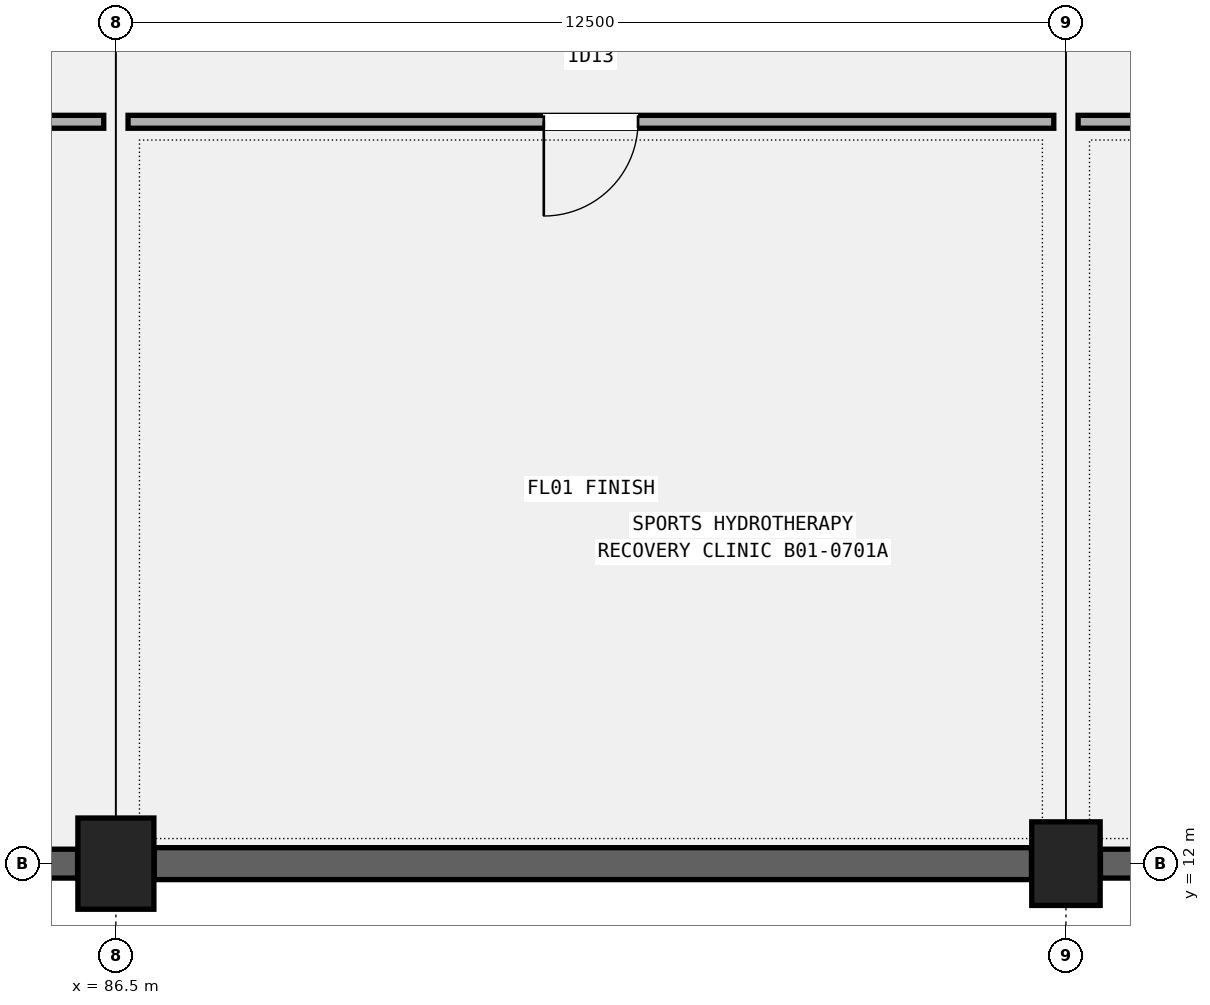
"""IFC4 building model, lengths in metres.
Left out: names, types, materials, properties, quantities, classifications, styles, units other than length and angle.
Written with IfcOpenShell. Run it as: python <this file> out.ifc"""

import sys

from ifc_helpers import new_model, si_unit, direction, frame, frame_2d, origin, origin_2d, place, context, subcontext, project, spatial, rectangle, extrude, element, fill, save


model = new_model("IFC4")
c1 = context("Model", 3, precision=1e-05, world=origin(), true_north=direction((0.0, 1.0)))
c2 = subcontext(c1, "Body", "Model", "MODEL_VIEW")
j1 = project(units=[si_unit("LENGTHUNIT", "METRE"), si_unit("PLANEANGLEUNIT", "RADIAN")], contexts=[c1])
p1 = place(None, origin())
s1 = spatial("IfcSite", under=j1, at=p1, CompositionType="ELEMENT")
p2 = place(p1, origin())
s2 = spatial("IfcBuilding", under=s1, at=p2, CompositionType="ELEMENT")
p3 = place(p2, frame((0.0, 0.0, -4.8)))
s3 = spatial("IfcBuildingStorey", under=s2, at=p3, CompositionType="ELEMENT", Elevation=-4.8)
p4 = place(p3, frame((86.5, 12.0, 0.0), z_axis=(0.0, 0.0, 1.0), x_axis=(1.0, 0.0, 0.0)))
e1 = element("IfcColumn", 1, at=p4, inside=s3, PredefinedType="COLUMN", context=c2, shape_type="SweptSolid", body=[
    extrude(rectangle(XDim=1.0, YDim=1.2, at=origin_2d()), origin(), (0.0, 0.0, 1.0), 4.8),
])
p5 = place(p3, frame((99.0, 12.0, 0.0), z_axis=(0.0, 0.0, 1.0), x_axis=(1.0, 0.0, 0.0)))
e2 = element("IfcColumn", 2, at=p5, inside=s3, PredefinedType="COLUMN", context=c2, shape_type="SweptSolid", body=[
    extrude(rectangle(XDim=0.9, YDim=1.1, at=origin_2d()), origin(), (0.0, 0.0, 1.0), 4.8),
])
p6 = place(p3, frame((74.429, 12.0, 0.0), z_axis=(0.0, 0.0, 1.0), x_axis=(1.0, 0.0, 0.0)))
e3 = element("IfcWall", 3, at=p6, inside=s3, PredefinedType="STANDARD", context=c2, shape_type="SweptSolid", body=[
    extrude(rectangle(XDim=11.567, YDim=0.38, at=frame_2d((5.784, 0.0))), origin(), (0.0, 0.0, 1.0), 4.46),
])
p7 = place(p3, frame((87.004, 12.0, 0.0), z_axis=(0.0, 0.0, 1.0), x_axis=(1.0, 0.0, 0.0)))
e4 = element("IfcWall", 4, at=p7, inside=s3, PredefinedType="STANDARD", context=c2, shape_type="SweptSolid", body=[
    extrude(rectangle(XDim=11.542, YDim=0.42, at=frame_2d((5.771, 0.0))), origin(), (0.0, 0.0, 1.0), 4.46),
])
p8 = place(p3, frame((99.454, 12.0, 0.0), z_axis=(0.0, 0.0, 1.0), x_axis=(1.0, 0.0, 0.0)))
e5 = element("IfcWall", 5, at=p8, inside=s3, PredefinedType="STANDARD", context=c2, shape_type="SweptSolid", body=[
    extrude(rectangle(XDim=12.142, YDim=0.38, at=frame_2d((6.071, 0.0))), origin(), (0.0, 0.0, 1.0), 4.46),
])
p9 = place(p3, frame((74.16, 21.76, 0.0), z_axis=(0.0, 0.0, 1.0), x_axis=(1.0, 0.0, 0.0)))
e6 = element("IfcWall", 6, at=p9, inside=s3, PredefinedType="PARTITIONING", context=c2, shape_type="SweptSolid", body=[
    extrude(rectangle(XDim=12.18, YDim=0.17, at=frame_2d((6.09, 0.0))), origin(), (0.0, 0.0, 1.0), 3.92),
])
p10 = place(p9, frame((2.676, 0.0, 0.0), z_axis=(0.0, 0.0, 1.0), x_axis=(-1.0, 0.0, 0.0)))
e7 = element("IfcOpeningElement", 7, at=p10, cuts=e6, PredefinedType="OPENING", context=c2, shape_type="SweptSolid", body=[
    extrude(rectangle(XDim=1.12, YDim=2.18, at=frame_2d((0.56, 1.09))), frame((0.0, 0.095, 0.0), z_axis=(0.0, -1.0, 0.0), x_axis=(1.0, 0.0, 0.0)), (0.0, 0.0, 1.0), 0.19),
])
p11 = place(p9, frame((8.861, 0.0, 0.0), z_axis=(0.0, 0.0, 1.0), x_axis=(-1.0, 0.0, 0.0)))
e8 = element("IfcOpeningElement", 8, at=p11, cuts=e6, PredefinedType="OPENING", context=c2, shape_type="SweptSolid", body=[
    extrude(rectangle(XDim=1.15, YDim=2.15, at=frame_2d((0.575, 1.075))), frame((0.0, 0.095, 0.0), z_axis=(0.0, -1.0, 0.0), x_axis=(1.0, 0.0, 0.0)), (0.0, 0.0, 1.0), 0.19),
])
p12 = place(p3, frame((86.66, 21.76, 0.0), z_axis=(0.0, 0.0, 1.0), x_axis=(1.0, 0.0, 0.0)))
e9 = element("IfcWall", 9, at=p12, inside=s3, PredefinedType="PARTITIONING", context=c2, shape_type="SweptSolid", body=[
    extrude(rectangle(XDim=12.18, YDim=0.17, at=frame_2d((6.09, 0.0))), origin(), (0.0, 0.0, 1.0), 3.92),
])
p13 = place(p12, frame((6.71, 0.0, 0.0), z_axis=(0.0, 0.0, 1.0), x_axis=(-1.0, 0.0, 0.0)))
e10 = element("IfcOpeningElement", 10, at=p13, cuts=e9, PredefinedType="OPENING", context=c2, shape_type="SweptSolid", body=[
    extrude(rectangle(XDim=1.24, YDim=2.22, at=frame_2d((0.62, 1.11))), frame((0.0, 0.095, 0.0), z_axis=(0.0, -1.0, 0.0), x_axis=(1.0, 0.0, 0.0)), (0.0, 0.0, 1.0), 0.19),
])
p14 = place(p3, frame((99.16, 21.76, 0.0), z_axis=(0.0, 0.0, 1.0), x_axis=(1.0, 0.0, 0.0)))
e11 = element("IfcWall", 11, at=p14, inside=s3, PredefinedType="PARTITIONING", context=c2, shape_type="SweptSolid", body=[
    extrude(rectangle(XDim=12.68, YDim=0.17, at=frame_2d((6.34, 0.0))), origin(), (0.0, 0.0, 1.0), 3.92),
])
p15 = place(p14, frame((7.02, 0.0, 0.0), z_axis=(0.0, 0.0, 1.0), x_axis=(-1.0, 0.0, 0.0)))
e12 = element("IfcOpeningElement", 12, at=p15, cuts=e11, PredefinedType="OPENING", context=c2, shape_type="SweptSolid", body=[
    extrude(rectangle(XDim=1.36, YDim=2.25, at=frame_2d((0.68, 1.125))), frame((0.0, 0.095, 0.0), z_axis=(0.0, -1.0, 0.0), x_axis=(1.0, 0.0, 0.0)), (0.0, 0.0, 1.0), 0.19),
])
p16 = place(p13, origin())
e13 = element("IfcDoor", 13, at=p16, inside=s3, OperationType="SINGLE_SWING_RIGHT", PredefinedType="DOOR", context=c2, shape_type="SweptSolid", body=[
    extrude(rectangle(XDim=1.24, YDim=2.22, at=frame_2d((0.62, 1.11))), frame((0.0, 0.025, 0.0), z_axis=(0.0, -1.0, 0.0), x_axis=(1.0, 0.0, 0.0)), (0.0, 0.0, 1.0), 0.05),
])
fill(e10, e13)
save(model, sys.argv[1])
